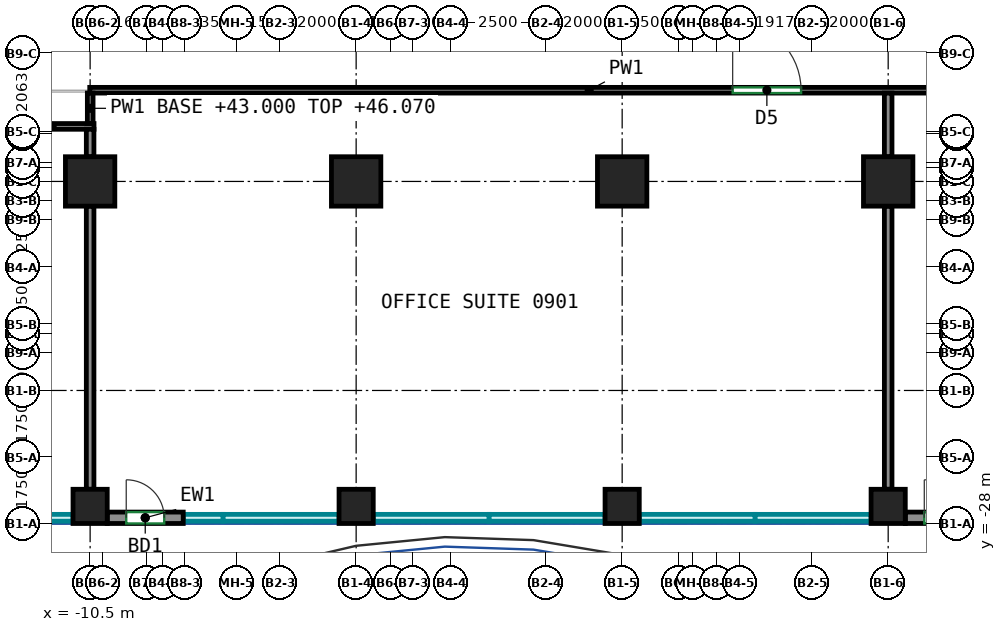
"""IFC4 building model, lengths in metres.
Left out: names, types, materials, properties, quantities, classifications, styles, units other than length and angle.
Written with IfcOpenShell. Run it as: python <this file> out.ifc"""

import sys

from ifc_helpers import new_model, si_unit, direction, frame, frame_2d, origin, origin_2d, place, context, subcontext, project, spatial, rectangle, extrude, source, transform, mapped, element, fill, save


model = new_model("IFC4")
c1 = context("Model", 3, precision=1e-05, world=origin(), true_north=direction((0.0, 1.0)))
c2 = subcontext(c1, "Body", "Model", "MODEL_VIEW")
j1 = project(units=[si_unit("LENGTHUNIT", "METRE"), si_unit("PLANEANGLEUNIT", "RADIAN")], contexts=[c1])
p1 = place(None, origin())
s1 = spatial("IfcSite", under=j1, at=p1, CompositionType="ELEMENT")
p2 = place(p1, origin())
s2 = spatial("IfcBuilding", under=s1, at=p2, CompositionType="ELEMENT")
p3 = place(p2, frame((0.0, 0.0, 43.0)))
s3 = spatial("IfcBuildingStorey", under=s2, at=p3, CompositionType="ELEMENT", Elevation=43.0)
m1 = source(origin(), c2, "Body", "SweptSolid", [
    extrude(rectangle(XDim=0.9, YDim=0.9, at=origin_2d()), origin(), (0.0, 0.0, 1.0), 3.72),
])
p4 = place(p3, frame((-10.5, -27.55, 0.0), z_axis=(0.0, 0.0, 1.0), x_axis=(1.0, 0.0, 0.0)))
e1 = element("IfcColumn", 1, at=p4, inside=s3, PredefinedType="COLUMN", context=c2, shape_type="MappedRepresentation", body=[
    mapped(m1, transform((0.0, 0.0, 0.0))),
])
m2 = source(origin(), c2, "Body", "SweptSolid", [
    extrude(rectangle(XDim=1.3, YDim=1.3, at=origin_2d()), origin(), (0.0, 0.0, 1.0), 3.72),
])
p5 = place(p3, frame((-10.5, -19.0, 0.0), z_axis=(0.0, 0.0, 1.0), x_axis=(1.0, 0.0, 0.0)))
e2 = element("IfcColumn", 2, at=p5, inside=s3, PredefinedType="COLUMN", context=c2, shape_type="MappedRepresentation", body=[
    mapped(m2, transform((0.0, 0.0, 0.0))),
])
p6 = place(p3, frame((-3.5, -27.55, 0.0), z_axis=(0.0, 0.0, 1.0), x_axis=(1.0, 0.0, 0.0)))
e3 = element("IfcColumn", 3, at=p6, inside=s3, PredefinedType="COLUMN", context=c2, shape_type="MappedRepresentation", body=[
    mapped(m1, transform((0.0, 0.0, 0.0))),
])
p7 = place(p3, frame((-3.5, -19.0, 0.0), z_axis=(0.0, 0.0, 1.0), x_axis=(1.0, 0.0, 0.0)))
e4 = element("IfcColumn", 4, at=p7, inside=s3, PredefinedType="COLUMN", context=c2, shape_type="MappedRepresentation", body=[
    mapped(m2, transform((0.0, 0.0, 0.0))),
])
p8 = place(p3, frame((3.5, -27.55, 0.0), z_axis=(0.0, 0.0, 1.0), x_axis=(1.0, 0.0, 0.0)))
e5 = element("IfcColumn", 5, at=p8, inside=s3, PredefinedType="COLUMN", context=c2, shape_type="MappedRepresentation", body=[
    mapped(m1, transform((0.0, 0.0, 0.0))),
])
p9 = place(p3, frame((3.5, -19.0, 0.0), z_axis=(0.0, 0.0, 1.0), x_axis=(1.0, 0.0, 0.0)))
e6 = element("IfcColumn", 6, at=p9, inside=s3, PredefinedType="COLUMN", context=c2, shape_type="MappedRepresentation", body=[
    mapped(m2, transform((0.0, 0.0, 0.0))),
])
p10 = place(p3, frame((10.5, -27.55, 0.0), z_axis=(0.0, 0.0, 1.0), x_axis=(1.0, 0.0, 0.0)))
e7 = element("IfcColumn", 7, at=p10, inside=s3, PredefinedType="COLUMN", context=c2, shape_type="MappedRepresentation", body=[
    mapped(m1, transform((0.0, 0.0, 0.0))),
])
p11 = place(p3, frame((10.5, -19.0, 0.0), z_axis=(0.0, 0.0, 1.0), x_axis=(1.0, 0.0, 0.0)))
e8 = element("IfcColumn", 8, at=p11, inside=s3, PredefinedType="COLUMN", context=c2, shape_type="MappedRepresentation", body=[
    mapped(m2, transform((0.0, 0.0, 0.0))),
])
m3 = source(origin(), c2, "Body", "SweptSolid", [
    extrude(rectangle(XDim=2.0, YDim=0.3, at=frame_2d((1.0, 0.0))), origin(), (0.0, 0.0, 1.0), 3.72),
])
p12 = place(p3, frame((-10.05, -27.85, 0.0), z_axis=(0.0, 0.0, 1.0), x_axis=(1.0, 0.0, 0.0)))
e9 = element("IfcWall", 9, at=p12, inside=s3, PredefinedType="SOLIDWALL", context=c2, shape_type="MappedRepresentation", body=[
    mapped(m3, transform((0.0, 0.0, 0.0))),
])
p13 = place(p12, frame((0.5, 0.0, 0.0)))
e10 = element("IfcOpeningElement", 10, at=p13, cuts=e9, PredefinedType="OPENING", context=c2, shape_type="SweptSolid", body=[
    extrude(rectangle(XDim=1.0, YDim=2.1, at=frame_2d((0.5, 1.05))), frame((0.0, 0.16, 0.0), z_axis=(0.0, -1.0, 0.0), x_axis=(1.0, 0.0, 0.0)), (0.0, 0.0, 1.0), 0.32),
])
p14 = place(p3, frame((10.95, -27.85, 0.0), z_axis=(0.0, 0.0, 1.0), x_axis=(1.0, 0.0, 0.0)))
e11 = element("IfcWall", 11, at=p14, inside=s3, PredefinedType="SOLIDWALL", context=c2, shape_type="MappedRepresentation", body=[
    mapped(m3, transform((0.0, 0.0, 0.0))),
])
p15 = place(p14, frame((0.5, 0.0, 0.0)))
e12 = element("IfcOpeningElement", 12, at=p15, cuts=e11, PredefinedType="OPENING", context=c2, shape_type="SweptSolid", body=[
    extrude(rectangle(XDim=1.0, YDim=2.1, at=frame_2d((0.5, 1.05))), frame((0.0, 0.16, 0.0), z_axis=(0.0, -1.0, 0.0), x_axis=(1.0, 0.0, 0.0)), (0.0, 0.0, 1.0), 0.32),
])
p16 = place(p3, frame((-12.602, -17.552, 0.0), z_axis=(0.0, 0.0, 1.0), x_axis=(1.0, 0.0, 0.0)))
e13 = element("IfcWall", 13, at=p16, inside=s3, PredefinedType="PARTITIONING", context=c2, shape_type="SweptSolid", body=[
    extrude(rectangle(XDim=2.204, YDim=0.15, at=frame_2d((1.102, 0.0))), origin(), (0.0, 0.0, 1.0), 3.72),
])
p17 = place(p3, frame((-10.51, -16.6, 0.0), z_axis=(0.0, 0.0, 1.0), x_axis=(1.0, 0.0, 0.0)))
e14 = element("IfcWall", 14, at=p17, inside=s3, PredefinedType="PARTITIONING", context=c2, shape_type="SweptSolid", body=[
    extrude(rectangle(XDim=26.285, YDim=0.15, at=frame_2d((13.143, 0.0))), origin(), (0.0, 0.0, 1.0), 3.72),
])
p18 = place(p17, frame((16.918, 0.0, 0.0)))
e15 = element("IfcOpeningElement", 15, at=p18, cuts=e14, PredefinedType="OPENING", context=c2, shape_type="SweptSolid", body=[
    extrude(rectangle(XDim=1.8, YDim=2.1, at=frame_2d((0.9, 1.05))), frame((0.0, 0.085, 0.0), z_axis=(0.0, -1.0, 0.0), x_axis=(1.0, 0.0, 0.0)), (0.0, 0.0, 1.0), 0.17),
])
p19 = place(p3, frame((-10.498, -17.477, 0.0), z_axis=(0.0, 0.0, 1.0), x_axis=(0.0, 1.0, 0.0)))
e16 = element("IfcWall", 16, at=p19, inside=s3, PredefinedType="PARTITIONING", context=c2, shape_type="SweptSolid", body=[
    extrude(rectangle(XDim=0.802, YDim=0.15, at=frame_2d((0.401, 0.0))), origin(), (0.0, 0.0, 1.0), 3.07),
])
p20 = place(p3, frame((-10.5, -18.35, 0.0), z_axis=(0.0, 0.0, 1.0), x_axis=(0.0, 1.0, 0.0)))
e17 = element("IfcWall", 17, at=p20, inside=s3, PredefinedType="PARTITIONING", context=c2, shape_type="SweptSolid", body=[
    extrude(rectangle(XDim=0.723, YDim=0.2, at=frame_2d((0.362, 0.0))), origin(), (0.0, 0.0, 1.0), 3.07),
])
p21 = place(p3, frame((-10.5, -27.1, 0.0), z_axis=(0.0, 0.0, 1.0), x_axis=(0.0, 1.0, 0.0)))
e18 = element("IfcWall", 18, at=p21, inside=s3, PredefinedType="PARTITIONING", context=c2, shape_type="SweptSolid", body=[
    extrude(rectangle(XDim=7.45, YDim=0.2, at=frame_2d((3.725, 0.0))), origin(), (0.0, 0.0, 1.0), 3.07),
])
p22 = place(p3, frame((10.5, -18.35, 0.0), z_axis=(0.0, 0.0, 1.0), x_axis=(0.0, 1.0, 0.0)))
e19 = element("IfcWall", 19, at=p22, inside=s3, PredefinedType="PARTITIONING", context=c2, shape_type="SweptSolid", body=[
    extrude(rectangle(XDim=1.674, YDim=0.2, at=frame_2d((0.837, 0.0))), origin(), (0.0, 0.0, 1.0), 3.07),
])
p23 = place(p3, frame((10.5, -27.1, 0.0), z_axis=(0.0, 0.0, 1.0), x_axis=(0.0, 1.0, 0.0)))
e20 = element("IfcWall", 20, at=p23, inside=s3, PredefinedType="PARTITIONING", context=c2, shape_type="SweptSolid", body=[
    extrude(rectangle(XDim=7.45, YDim=0.2, at=frame_2d((3.725, 0.0))), origin(), (0.0, 0.0, 1.0), 3.07),
])
p24 = place(p13, origin())
e21 = element("IfcDoor", 21, at=p24, inside=s3, OperationType="SINGLE_SWING_LEFT", PredefinedType="DOOR", context=c2, shape_type="SweptSolid", body=[
    extrude(rectangle(XDim=1.0, YDim=2.1, at=frame_2d((0.5, 1.05))), frame((0.0, 0.025, 0.0), z_axis=(0.0, -1.0, 0.0), x_axis=(1.0, 0.0, 0.0)), (0.0, 0.0, 1.0), 0.05),
])
fill(e10, e21)
p25 = place(p15, origin())
e22 = element("IfcDoor", 22, at=p25, inside=s3, OperationType="SINGLE_SWING_LEFT", PredefinedType="DOOR", context=c2, shape_type="SweptSolid", body=[
    extrude(rectangle(XDim=1.0, YDim=2.1, at=frame_2d((0.5, 1.05))), frame((0.0, 0.025, 0.0), z_axis=(0.0, -1.0, 0.0), x_axis=(1.0, 0.0, 0.0)), (0.0, 0.0, 1.0), 0.05),
])
fill(e12, e22)
p26 = place(p18, origin())
e23 = element("IfcDoor", 23, at=p26, inside=s3, OperationType="DOUBLE_DOOR_SINGLE_SWING", PredefinedType="DOOR", context=c2, shape_type="SweptSolid", body=[
    extrude(rectangle(XDim=1.8, YDim=2.1, at=frame_2d((0.9, 1.05))), frame((0.0, 0.025, 0.0), z_axis=(0.0, -1.0, 0.0), x_axis=(1.0, 0.0, 0.0)), (0.0, 0.0, 1.0), 0.05),
])
fill(e15, e23)
save(model, sys.argv[1])
